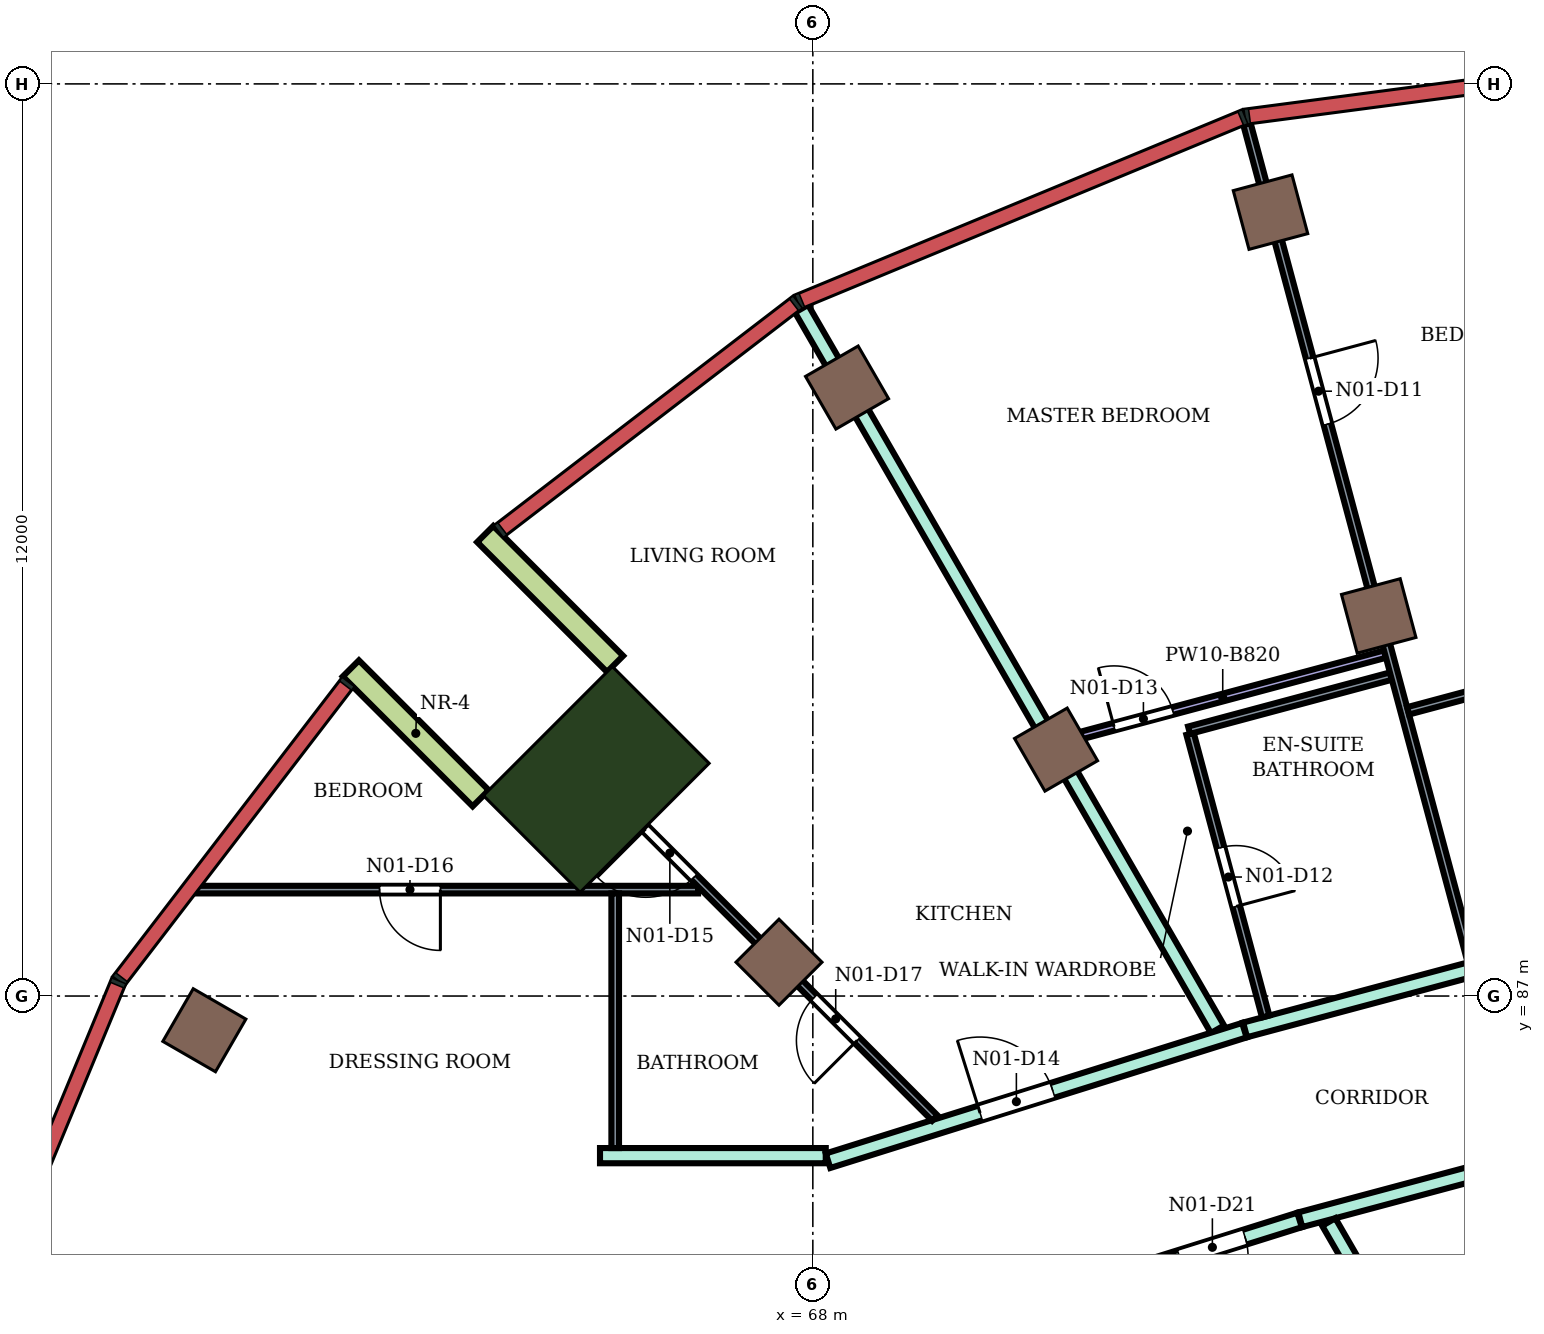
"""IFC4 building model, lengths in metres.
Left out: names, types, materials, properties, quantities, classifications, styles, units other than length and angle.
Written with IfcOpenShell. Run it as: python <this file> out.ifc"""

import sys

from ifc_helpers import new_model, si_unit, direction, frame, frame_2d, origin, origin_2d, place, context, subcontext, project, spatial, rectangle, extrude, element, fill, save


model = new_model("IFC4")
c1 = context("Model", 3, precision=1e-05, world=origin(), true_north=direction((0.0, 1.0)))
c2 = subcontext(c1, "Body", "Model", "MODEL_VIEW")
j1 = project(units=[si_unit("LENGTHUNIT", "METRE"), si_unit("PLANEANGLEUNIT", "RADIAN")], contexts=[c1])
p1 = place(None, origin())
s1 = spatial("IfcSite", under=j1, at=p1, CompositionType="ELEMENT")
p2 = place(p1, origin())
s2 = spatial("IfcBuilding", under=s1, at=p2, CompositionType="ELEMENT")
p3 = place(p2, frame((0.0, 0.0, 279.9)))
s3 = spatial("IfcBuildingStorey", under=s2, at=p3, CompositionType="ELEMENT", Elevation=279.9)
for number, where, z_axis, x_axis in (
    (1, (74.021, 97.313, 0.0), (0.0, 0.0, 1.0), (-0.259, 0.966, 0.0)),
    (2, (68.45, 95.005, 0.0), (0.0, 0.0, 1.0), (-0.5, 0.866, 0.0)),
    (3, (59.995, 86.55, 0.0), (0.0, 0.0, 1.0), (-0.866, 0.5, 0.0)),
    (4, (75.445, 92.0, 0.0), (0.0, 0.0, 1.0), (-0.259, 0.966, 0.0)),
    (5, (71.2, 90.242, 0.0), (0.0, 0.0, 1.0), (-0.5, 0.866, 0.0)),
    (6, (67.555, 87.445, 0.0), (0.0, 0.0, 1.0), (-0.707, 0.707, 0.0)),
):
    element("IfcColumn", number, at=place(p3, frame(where, z_axis=z_axis, x_axis=x_axis)), inside=s3, PredefinedType="COLUMN", context=c2, shape_type="SweptSolid", body=[
        extrude(rectangle(XDim=0.8, YDim=0.8, at=origin_2d()), origin(), (0.0, 0.0, 1.0), 4.2),
    ])
p4 = place(p3, frame((65.151, 89.849, 0.0), z_axis=(0.0, 0.0, 1.0), x_axis=(-0.707106781187, 0.707106781187, 0.0)))
e7 = element("IfcColumn", 7, at=p4, inside=s3, PredefinedType="COLUMN", context=c2, shape_type="SweptSolid", body=[
    extrude(rectangle(XDim=1.8, YDim=2.4, at=origin_2d()), origin(), (0.0, 0.0, 1.0), 4.2),
])
for number, where, z_axis, x_axis in (
    (8, (65.398, 91.37, 0.0), (0.0, 0.0, 1.0), (-0.707, 0.707, 0.0)),
    (9, (63.63, 89.602, 0.0), (0.0, 0.0, 1.0), (-0.707, 0.707, 0.0)),
):
    element("IfcWall", number, at=place(p3, frame(where, z_axis=z_axis, x_axis=x_axis)), inside=s3, PredefinedType="NOTDEFINED", context=c2, shape_type="SweptSolid", body=[
        extrude(rectangle(XDim=2.416, YDim=0.3, at=frame_2d((1.208, 0.0))), origin(), (0.0, 0.0, 1.0), 4.2),
    ])
p5 = place(p3, frame((65.2, 84.9, 0.0), z_axis=(0.0, 0.0, 1.0), x_axis=(1.0, 0.0, 0.0)))
e10 = element("IfcWall", 10, at=p5, inside=s3, PredefinedType="PARTITIONING", context=c2, shape_type="SweptSolid", body=[
    extrude(rectangle(XDim=2.97, YDim=0.2, at=frame_2d((1.485, 0.0))), origin(), (0.0, 0.0, 1.0), 3.75),
])
p6 = place(p3, frame((67.852, 96.042, 0.0), z_axis=(0.0, 0.0, 1.0), x_axis=(0.499960582802, -0.866048160118, 0.0)))
e11 = element("IfcWall", 11, at=p6, inside=s3, PredefinedType="PARTITIONING", context=c2, shape_type="SweptSolid", body=[
    extrude(rectangle(XDim=10.946, YDim=0.2, at=frame_2d((5.473, 0.0))), origin(), (0.0, 0.0, 1.0), 3.75),
])
p7 = place(p3, frame((68.2, 84.833, 0.0), z_axis=(0.0, 0.0, 1.0), x_axis=(0.954191968402, 0.299195065863, 0.0)))
e12 = element("IfcWall", 12, at=p7, inside=s3, PredefinedType="PARTITIONING", context=c2, shape_type="SweptSolid", body=[
    extrude(rectangle(XDim=5.74, YDim=0.2, at=frame_2d((2.87, 0.0))), origin(), (0.0, 0.0, 1.0), 3.75),
])
p8 = place(p7, frame((2.097, 0.0, 0.0)))
e13 = element("IfcOpeningElement", 13, at=p8, cuts=e12, PredefinedType="OPENING", context=c2, shape_type="SweptSolid", body=[
    extrude(rectangle(XDim=1.0, YDim=2.1, at=frame_2d((0.5, 1.05))), frame((0.0, 0.11, 0.0), z_axis=(0.0, -1.0, 0.0), x_axis=(1.0, 0.0, 0.0)), (0.0, 0.0, 1.0), 0.22),
])
p9 = place(p3, frame((72.1, 83.332, 0.0), z_axis=(0.0, 0.0, 1.0), x_axis=(0.954233106619, 0.299063836383, 0.0)))
e14 = element("IfcWall", 14, at=p9, inside=s3, PredefinedType="PARTITIONING", context=c2, shape_type="SweptSolid", body=[
    extrude(rectangle(XDim=2.414, YDim=0.2, at=frame_2d((1.207, 0.0))), origin(), (0.0, 0.0, 1.0), 3.75),
])
p10 = place(p9, frame((0.762, 0.0, 0.0)))
e15 = element("IfcOpeningElement", 15, at=p10, cuts=e14, PredefinedType="OPENING", context=c2, shape_type="SweptSolid", body=[
    extrude(rectangle(XDim=0.9, YDim=2.1, at=frame_2d((0.45, 1.05))), frame((0.0, 0.11, 0.0), z_axis=(0.0, -1.0, 0.0), x_axis=(1.0, 0.0, 0.0)), (0.0, 0.0, 1.0), 0.22),
])
p11 = place(p3, frame((73.687, 86.554, 0.0), z_axis=(0.0, 0.0, 1.0), x_axis=(0.966002126521, 0.258534120682, 0.0)))
e16 = element("IfcWall", 16, at=p11, inside=s3, PredefinedType="PARTITIONING", context=c2, shape_type="SweptSolid", body=[
    extrude(rectangle(XDim=6.486, YDim=0.2, at=frame_2d((3.243, 0.0))), origin(), (0.0, 0.0, 1.0), 3.75),
])
p12 = place(p3, frame((74.413, 84.057, 0.0), z_axis=(0.0, 0.0, 1.0), x_axis=(0.965972135939, 0.258646153246, 0.0)))
e17 = element("IfcWall", 17, at=p12, inside=s3, PredefinedType="PARTITIONING", context=c2, shape_type="SweptSolid", body=[
    extrude(rectangle(XDim=5.654, YDim=0.2, at=frame_2d((2.827, 0.0))), origin(), (0.0, 0.0, 1.0), 3.75),
])
p13 = place(p12, frame((2.593, 0.0, 0.0)))
e18 = element("IfcOpeningElement", 18, at=p13, cuts=e17, PredefinedType="OPENING", context=c2, shape_type="SweptSolid", body=[
    extrude(rectangle(XDim=0.9, YDim=2.1, at=frame_2d((0.45, 1.05))), frame((0.0, 0.11, 0.0), z_axis=(0.0, -1.0, 0.0), x_axis=(1.0, 0.0, 0.0)), (0.0, 0.0, 1.0), 0.22),
])
p14 = place(p3, frame((74.788, 84.027, 0.0), z_axis=(0.0, 0.0, 1.0), x_axis=(0.49997314572, -0.866040907555, 0.0)))
e19 = element("IfcWall", 19, at=p14, inside=s3, PredefinedType="PARTITIONING", context=c2, shape_type="SweptSolid", body=[
    extrude(rectangle(XDim=2.726, YDim=0.2, at=frame_2d((1.363, 0.0))), origin(), (0.0, 0.0, 1.0), 3.75),
])
p15 = place(p3, frame((59.87, 88.4, 0.0), z_axis=(0.0, 0.0, 1.0), x_axis=(1.0, 0.0, 0.0)))
e20 = element("IfcWall", 20, at=p15, inside=s3, PredefinedType="PARTITIONING", context=c2, shape_type="SweptSolid", body=[
    extrude(rectangle(XDim=6.62, YDim=0.1, at=frame_2d((3.31, 0.0))), origin(), (0.0, 0.0, 1.0), 3.75),
])
p16 = place(p15, frame((2.43, 0.0, 0.0)))
e21 = element("IfcOpeningElement", 21, at=p16, cuts=e20, PredefinedType="OPENING", context=c2, shape_type="SweptSolid", body=[
    extrude(rectangle(XDim=0.8, YDim=2.1, at=frame_2d((0.4, 1.05))), frame((0.0, 0.06, 0.0), z_axis=(0.0, -1.0, 0.0), x_axis=(1.0, 0.0, 0.0)), (0.0, 0.0, 1.0), 0.12),
])
p17 = place(p3, frame((64.656, 90.344, 0.0), z_axis=(0.0, 0.0, 1.0), x_axis=(0.707106781187, -0.707106781187, 0.0)))
e22 = element("IfcWall", 22, at=p17, inside=s3, PredefinedType="PARTITIONING", context=c2, shape_type="SweptSolid", body=[
    extrude(rectangle(XDim=7.0, YDim=0.1, at=frame_2d((3.5, 0.0))), origin(), (0.0, 0.0, 1.0), 3.75),
])
p18 = place(p17, frame((1.619, 0.0, 0.0)))
e23 = element("IfcOpeningElement", 23, at=p18, cuts=e22, PredefinedType="OPENING", context=c2, shape_type="SweptSolid", body=[
    extrude(rectangle(XDim=0.9, YDim=2.1, at=frame_2d((0.45, 1.05))), frame((0.0, 0.06, 0.0), z_axis=(0.0, -1.0, 0.0), x_axis=(1.0, 0.0, 0.0)), (0.0, 0.0, 1.0), 0.12),
])
p19 = place(p17, frame((4.755, 0.0, 0.0)))
e24 = element("IfcOpeningElement", 24, at=p19, cuts=e22, PredefinedType="OPENING", context=c2, shape_type="SweptSolid", body=[
    extrude(rectangle(XDim=0.8, YDim=2.1, at=frame_2d((0.4, 1.05))), frame((0.0, 0.06, 0.0), z_axis=(0.0, -1.0, 0.0), x_axis=(1.0, 0.0, 0.0)), (0.0, 0.0, 1.0), 0.12),
])
p20 = place(p3, frame((65.4, 85.0, 0.0), z_axis=(0.0, 0.0, 1.0), x_axis=(0.0, 1.0, 0.0)))
e25 = element("IfcWall", 25, at=p20, inside=s3, PredefinedType="PARTITIONING", context=c2, shape_type="SweptSolid", body=[
    extrude(rectangle(XDim=3.35, YDim=0.1, at=frame_2d((1.675, 0.0))), origin(), (0.0, 0.0, 1.0), 3.75),
])
p21 = place(p3, frame((71.258, 90.354, 0.0), z_axis=(0.0, 0.0, 1.0), x_axis=(0.965955692548, 0.258707556973, 0.0)))
e26 = element("IfcWall", 26, at=p21, inside=s3, PredefinedType="PARTITIONING", context=c2, shape_type="SweptSolid", body=[
    extrude(rectangle(XDim=4.42, YDim=0.1, at=frame_2d((2.21, 0.0))), origin(), (0.0, 0.0, 1.0), 3.38),
])
p22 = place(p21, frame((0.73, 0.0, 0.0)))
e27 = element("IfcOpeningElement", 27, at=p22, cuts=e26, PredefinedType="OPENING", context=c2, shape_type="SweptSolid", body=[
    extrude(rectangle(XDim=0.8, YDim=2.1, at=frame_2d((0.4, 1.05))), frame((0.0, 0.06, 0.0), z_axis=(0.0, -1.0, 0.0), x_axis=(1.0, 0.0, 0.0)), (0.0, 0.0, 1.0), 0.12),
])
p23 = place(p3, frame((72.963, 90.449, 0.0), z_axis=(0.0, 0.0, 1.0), x_axis=(0.25854689918, -0.965998706482, 0.0)))
e28 = element("IfcWall", 28, at=p23, inside=s3, PredefinedType="PARTITIONING", context=c2, shape_type="SweptSolid", body=[
    extrude(rectangle(XDim=3.849, YDim=0.1, at=frame_2d((1.924, 0.0))), origin(), (0.0, 0.0, 1.0), 3.75),
])
p24 = place(p23, frame((1.55, 0.0, 0.0)))
e29 = element("IfcOpeningElement", 29, at=p24, cuts=e28, PredefinedType="OPENING", context=c2, shape_type="SweptSolid", body=[
    extrude(rectangle(XDim=0.8, YDim=2.1, at=frame_2d((0.4, 1.05))), frame((0.0, 0.06, 0.0), z_axis=(0.0, -1.0, 0.0), x_axis=(1.0, 0.0, 0.0)), (0.0, 0.0, 1.0), 0.12),
])
p25 = place(p3, frame((72.95, 90.497, 0.0), z_axis=(0.0, 0.0, 1.0), x_axis=(0.96588619323, 0.258966912418, 0.0)))
e30 = element("IfcWall", 30, at=p25, inside=s3, PredefinedType="PARTITIONING", context=c2, shape_type="SweptSolid", body=[
    extrude(rectangle(XDim=2.749, YDim=0.1, at=frame_2d((1.375, 0.0))), origin(), (0.0, 0.0, 1.0), 3.75),
])
p26 = place(p3, frame((73.712, 98.47, 0.0), z_axis=(0.0, 0.0, 1.0), x_axis=(0.258727167471, -0.965950440143, 0.0)))
e31 = element("IfcWall", 31, at=p26, inside=s3, PredefinedType="PARTITIONING", context=c2, shape_type="SweptSolid", body=[
    extrude(rectangle(XDim=11.404, YDim=0.1, at=frame_2d((5.702, 0.0))), origin(), (0.0, 0.0, 1.0), 3.75),
])
p27 = place(p26, frame((3.187, 0.0, 0.0)))
e32 = element("IfcOpeningElement", 32, at=p27, cuts=e31, PredefinedType="OPENING", context=c2, shape_type="SweptSolid", body=[
    extrude(rectangle(XDim=0.9, YDim=2.1, at=frame_2d((0.45, 1.05))), frame((0.0, 0.06, 0.0), z_axis=(0.0, -1.0, 0.0), x_axis=(1.0, 0.0, 0.0)), (0.0, 0.0, 1.0), 0.12),
])
p28 = place(p3, frame((75.832, 90.752, 0.0), z_axis=(0.0, 0.0, 1.0), x_axis=(0.965856843682, 0.259076354601, 0.0)))
e33 = element("IfcWall", 33, at=p28, inside=s3, PredefinedType="PARTITIONING", context=c2, shape_type="SweptSolid", body=[
    extrude(rectangle(XDim=4.256, YDim=0.1, at=frame_2d((2.128, 0.0))), origin(), (0.0, 0.0, 1.0), 3.75),
])
p29 = place(p28, frame((1.733, 0.0, 0.0)))
e34 = element("IfcOpeningElement", 34, at=p29, cuts=e33, PredefinedType="OPENING", context=c2, shape_type="SweptSolid", body=[
    extrude(rectangle(XDim=0.8, YDim=2.1, at=frame_2d((0.4, 1.05))), frame((0.0, 0.06, 0.0), z_axis=(0.0, -1.0, 0.0), x_axis=(1.0, 0.0, 0.0)), (0.0, 0.0, 1.0), 0.12),
])
p30 = place(p27, origin())
e35 = element("IfcDoor", 35, at=p30, inside=s3, OperationType="SINGLE_SWING_LEFT", PredefinedType="DOOR", context=c2, shape_type="SweptSolid", body=[
    extrude(rectangle(XDim=0.9, YDim=2.1, at=frame_2d((0.45, 1.05))), frame((0.0, 0.025, 0.0), z_axis=(0.0, -1.0, 0.0), x_axis=(1.0, 0.0, 0.0)), (0.0, 0.0, 1.0), 0.05),
])
fill(e32, e35)
p31 = place(p24, origin())
e36 = element("IfcDoor", 36, at=p31, inside=s3, OperationType="SINGLE_SWING_RIGHT", PredefinedType="DOOR", context=c2, shape_type="SweptSolid", body=[
    extrude(rectangle(XDim=0.8, YDim=2.1, at=frame_2d((0.4, 1.05))), frame((0.0, 0.025, 0.0), z_axis=(0.0, -1.0, 0.0), x_axis=(1.0, 0.0, 0.0)), (0.0, 0.0, 1.0), 0.05),
])
fill(e29, e36)
p32 = place(p22, origin())
e37 = element("IfcDoor", 37, at=p32, inside=s3, OperationType="SINGLE_SWING_LEFT", PredefinedType="DOOR", context=c2, shape_type="SweptSolid", body=[
    extrude(rectangle(XDim=0.8, YDim=2.1, at=frame_2d((0.4, 1.05))), frame((0.0, 0.025, 0.0), z_axis=(0.0, -1.0, 0.0), x_axis=(1.0, 0.0, 0.0)), (0.0, 0.0, 1.0), 0.05),
])
fill(e27, e37)
p33 = place(p8, origin())
e38 = element("IfcDoor", 38, at=p33, inside=s3, OperationType="SINGLE_SWING_LEFT", PredefinedType="DOOR", context=c2, shape_type="SweptSolid", body=[
    extrude(rectangle(XDim=1.0, YDim=2.1, at=frame_2d((0.5, 1.05))), frame((0.0, 0.025, 0.0), z_axis=(0.0, -1.0, 0.0), x_axis=(1.0, 0.0, 0.0)), (0.0, 0.0, 1.0), 0.05),
])
fill(e13, e38)
p34 = place(p18, frame((0.9, 0.0, 0.0), z_axis=(0.0, 0.0, 1.0), x_axis=(-1.0, 0.0, 0.0)))
e39 = element("IfcDoor", 39, at=p34, inside=s3, OperationType="SINGLE_SWING_RIGHT", PredefinedType="DOOR", context=c2, shape_type="SweptSolid", body=[
    extrude(rectangle(XDim=0.9, YDim=2.1, at=frame_2d((0.45, 1.05))), frame((0.0, 0.025, 0.0), z_axis=(0.0, -1.0, 0.0), x_axis=(1.0, 0.0, 0.0)), (0.0, 0.0, 1.0), 0.05),
])
fill(e23, e39)
p35 = place(p16, frame((0.8, 0.0, 0.0), z_axis=(0.0, 0.0, 1.0), x_axis=(-1.0, 0.0, 0.0)))
e40 = element("IfcDoor", 40, at=p35, inside=s3, OperationType="SINGLE_SWING_LEFT", PredefinedType="DOOR", context=c2, shape_type="SweptSolid", body=[
    extrude(rectangle(XDim=0.8, YDim=2.1, at=frame_2d((0.4, 1.05))), frame((0.0, 0.025, 0.0), z_axis=(0.0, -1.0, 0.0), x_axis=(1.0, 0.0, 0.0)), (0.0, 0.0, 1.0), 0.05),
])
fill(e21, e40)
p36 = place(p19, frame((0.8, 0.0, 0.0), z_axis=(0.0, 0.0, 1.0), x_axis=(-1.0, 0.0, 0.0)))
e41 = element("IfcDoor", 41, at=p36, inside=s3, OperationType="SINGLE_SWING_LEFT", PredefinedType="DOOR", context=c2, shape_type="SweptSolid", body=[
    extrude(rectangle(XDim=0.8, YDim=2.1, at=frame_2d((0.4, 1.05))), frame((0.0, 0.025, 0.0), z_axis=(0.0, -1.0, 0.0), x_axis=(1.0, 0.0, 0.0)), (0.0, 0.0, 1.0), 0.05),
])
fill(e24, e41)
p37 = place(p10, frame((0.9, 0.0, 0.0), z_axis=(0.0, 0.0, 1.0), x_axis=(-1.0, 0.0, 0.0)))
e42 = element("IfcDoor", 42, at=p37, inside=s3, OperationType="SINGLE_SWING_RIGHT", PredefinedType="DOOR", context=c2, shape_type="SweptSolid", body=[
    extrude(rectangle(XDim=0.9, YDim=2.1, at=frame_2d((0.45, 1.05))), frame((0.0, 0.025, 0.0), z_axis=(0.0, -1.0, 0.0), x_axis=(1.0, 0.0, 0.0)), (0.0, 0.0, 1.0), 0.05),
])
fill(e15, e42)
save(model, sys.argv[1])
